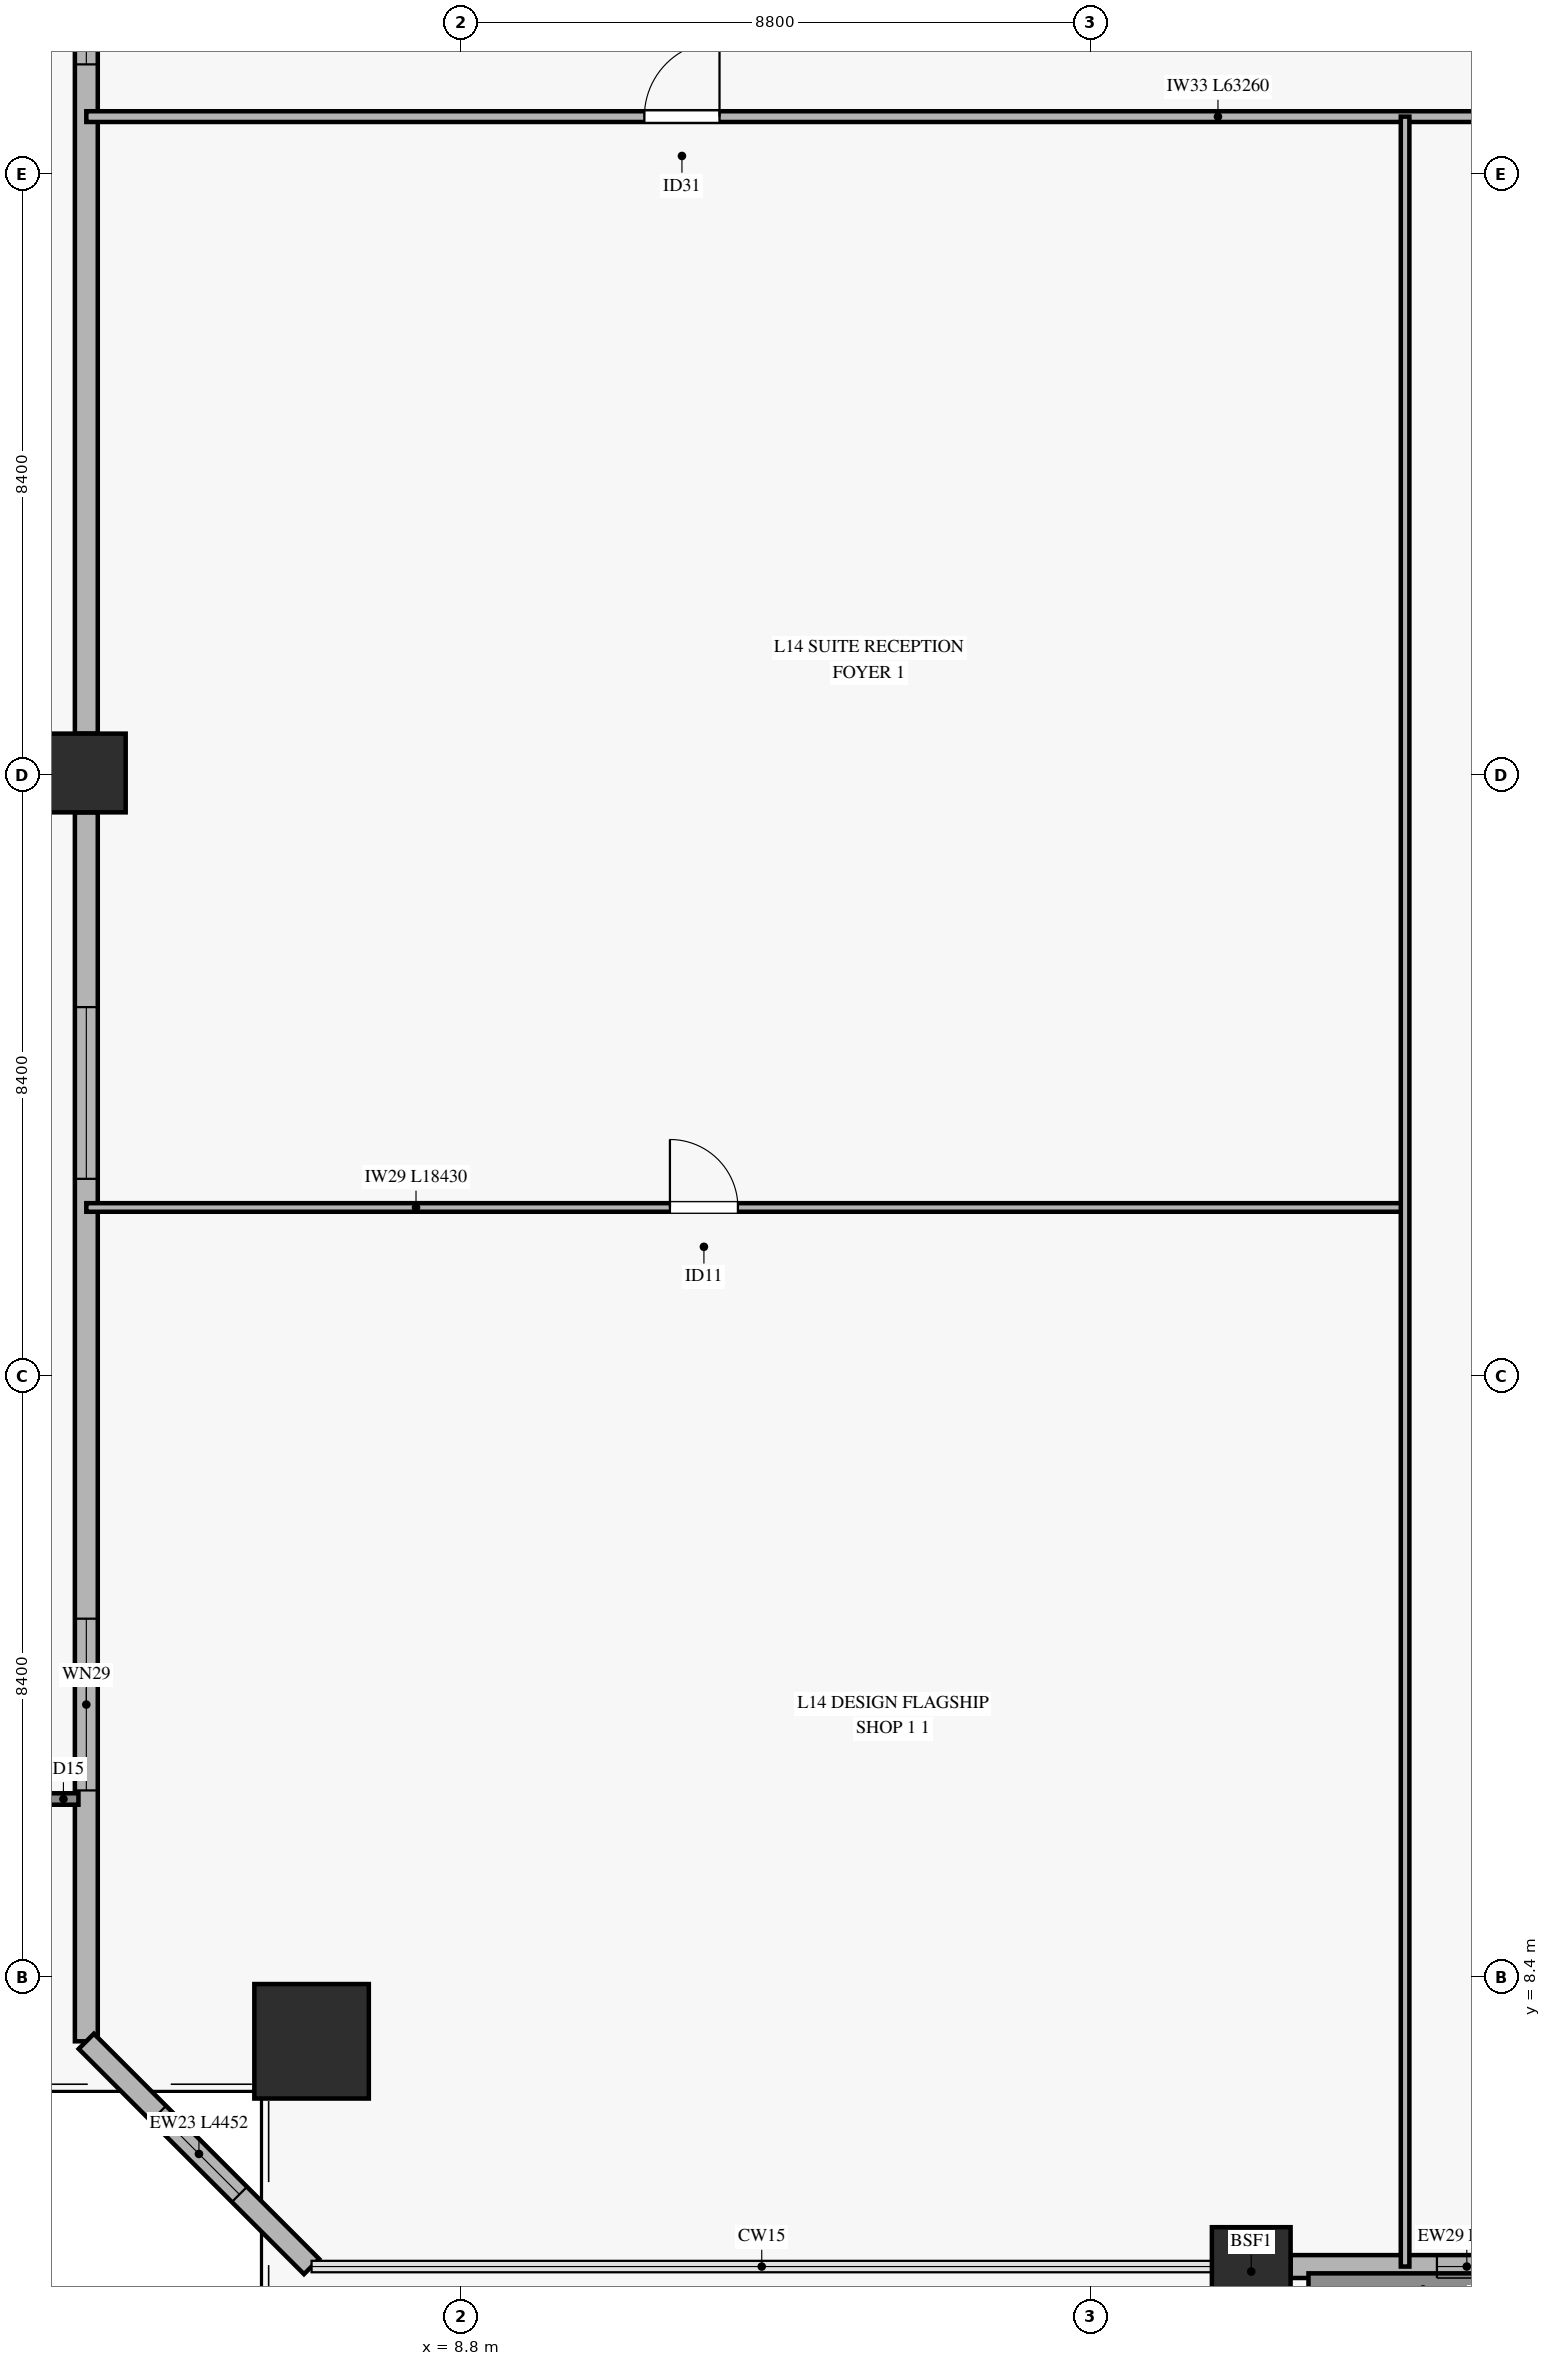
"""IFC4 building model, lengths in metres.
Left out: names, types, materials, properties, quantities, classifications, styles, units other than length and angle.
Written with IfcOpenShell. Run it as: python <this file> out.ifc"""

import sys

from ifc_helpers import new_model, si_unit, direction, frame, frame_2d, origin, origin_2d, place, context, subcontext, project, spatial, rectangle, hollow_rectangle, extrude, source, transform, mapped, element, fill, save


model = new_model("IFC4")
c1 = context("Model", 3, precision=1e-05, world=origin(), true_north=direction((0.0, 1.0)))
c2 = subcontext(c1, "Body", "Model", "MODEL_VIEW")
j1 = project(units=[si_unit("LENGTHUNIT", "METRE"), si_unit("PLANEANGLEUNIT", "RADIAN")], contexts=[c1])
p1 = place(None, origin())
s1 = spatial("IfcSite", under=j1, at=p1, CompositionType="ELEMENT")
p2 = place(p1, origin())
s2 = spatial("IfcBuilding", under=s1, at=p2, CompositionType="ELEMENT")
p3 = place(p2, frame((0.0, 0.0, 57.2)))
s3 = spatial("IfcBuildingStorey", under=s2, at=p3, CompositionType="ELEMENT", Elevation=57.2)
m1 = source(origin(), c2, "Body", "SweptSolid", [
    extrude(hollow_rectangle(XDim=1.6, YDim=1.6, WallThickness=0.075, at=origin_2d()), origin(), (0.0, 0.0, 1.0), 3.72),
])
p4 = place(p3, frame((6.718, 7.502, 0.0), z_axis=(0.056180364921, 0.134937885839, 0.989260093991), x_axis=(-0.923183164535, 0.384360305857, 0.0)))
e1 = element("IfcColumn", 1, at=p4, inside=s3, PredefinedType="COLUMN", context=c2, shape_type="MappedRepresentation", body=[
    mapped(m1, transform((0.0, 0.0, 0.0), x_axis=(1.0, 0.0, 0.0), y_axis=(0.0, 1.0, 0.0), z_axis=(0.0, 0.0, 1.0), scale=1.0)),
])
m2 = source(origin(), c2, "Body", "SweptSolid", [
    extrude(hollow_rectangle(XDim=1.1, YDim=1.1, WallThickness=0.05, at=origin_2d()), origin(), (0.0, 0.0, 1.0), 3.718),
])
p5 = place(p3, frame((19.85, 4.354, 0.0), z_axis=(0.0, 0.142046516587, 0.989859983596), x_axis=(-1.0, 0.0, 0.0)))
e2 = element("IfcColumn", 2, at=p5, inside=s3, PredefinedType="COLUMN", context=c2, shape_type="MappedRepresentation", body=[
    mapped(m2, transform((0.0, 0.0, 0.0), x_axis=(1.0, 0.0, 0.0), y_axis=(0.0, 1.0, 0.0), z_axis=(0.0, 0.0, 1.0), scale=1.0)),
])
m3 = source(origin(), c2, "Body", "SweptSolid", [
    extrude(hollow_rectangle(XDim=1.1, YDim=1.1, WallThickness=0.05, at=origin_2d()), origin(), (0.0, 0.0, 1.0), 3.697),
])
p6 = place(p3, frame((3.57, 25.227, 0.0), z_axis=(0.063530627599, 0.071389405857, 0.995423232644), x_axis=(-0.747027925172, 0.664792658664, 0.0)))
e3 = element("IfcColumn", 3, at=p6, inside=s3, PredefinedType="COLUMN", context=c2, shape_type="MappedRepresentation", body=[
    mapped(m3, transform((0.0, 0.0, 0.0), x_axis=(1.0, 0.0, 0.0), y_axis=(0.0, 1.0, 0.0), z_axis=(0.0, 0.0, 1.0), scale=1.0)),
])
p7 = place(p3, frame((20.4, 4.354, 0.0), z_axis=(0.0, 0.0, 1.0), x_axis=(1.0, 0.0, 0.0)))
e4 = element("IfcWall", 4, at=p7, inside=s3, PredefinedType="SOLIDWALL", context=c2, shape_type="SweptSolid", body=[
    extrude(rectangle(XDim=9.85, YDim=0.32, at=frame_2d((4.925, 0.0))), origin(), (0.0, 0.0, 1.0), 3.16),
])
p8 = place(p7, frame((4.0, 0.0, 0.0)))
e5 = element("IfcOpeningElement", 5, at=p8, cuts=e4, PredefinedType="OPENING", context=c2, shape_type="SweptSolid", body=[
    extrude(rectangle(XDim=1.8, YDim=2.25, at=frame_2d((0.9, 1.125))), frame((0.0, 0.17, 0.0), z_axis=(0.0, -1.0, 0.0), x_axis=(1.0, 0.0, 0.0)), (0.0, 0.0, 1.0), 0.34),
])
p9 = place(p7, frame((2.045, 0.0, 0.45)))
e6 = element("IfcOpeningElement", 6, at=p9, cuts=e4, PredefinedType="OPENING", context=c2, shape_type="SweptSolid", body=[
    extrude(rectangle(XDim=1.6, YDim=2.0, at=frame_2d((0.8, 1.0))), frame((0.0, 0.17, 0.0), z_axis=(0.0, -1.0, 0.0), x_axis=(1.0, 0.0, 0.0)), (0.0, 0.0, 1.0), 0.34),
])
p10 = place(p7, frame((7.35, 0.0, 0.45)))
e7 = element("IfcOpeningElement", 7, at=p10, cuts=e4, PredefinedType="OPENING", context=c2, shape_type="SweptSolid", body=[
    extrude(rectangle(XDim=1.6, YDim=2.0, at=frame_2d((0.8, 1.0))), frame((0.0, 0.17, 0.0), z_axis=(0.0, -1.0, 0.0), x_axis=(1.0, 0.0, 0.0)), (0.0, 0.0, 1.0), 0.34),
])
p11 = place(p3, frame((3.57, 7.502, 0.0), z_axis=(0.0, 0.0, 1.0), x_axis=(0.0, 1.0, 0.0)))
e8 = element("IfcWall", 8, at=p11, inside=s3, PredefinedType="SOLIDWALL", context=c2, shape_type="SweptSolid", body=[
    extrude(rectangle(XDim=17.175, YDim=0.32, at=frame_2d((8.587, 0.0))), origin(), (0.0, 0.0, 1.0), 3.16),
])
p12 = place(p11, frame((3.506, 0.0, 0.45)))
e9 = element("IfcOpeningElement", 9, at=p12, cuts=e8, PredefinedType="OPENING", context=c2, shape_type="SweptSolid", body=[
    extrude(rectangle(XDim=2.4, YDim=2.1, at=frame_2d((1.2, 1.05))), frame((0.0, 0.17, 0.0), z_axis=(0.0, -1.0, 0.0), x_axis=(1.0, 0.0, 0.0)), (0.0, 0.0, 1.0), 0.34),
])
p13 = place(p11, frame((12.053, 0.0, 0.45)))
e10 = element("IfcOpeningElement", 10, at=p13, cuts=e8, PredefinedType="OPENING", context=c2, shape_type="SweptSolid", body=[
    extrude(rectangle(XDim=2.4, YDim=2.1, at=frame_2d((1.2, 1.05))), frame((0.0, 0.17, 0.0), z_axis=(0.0, -1.0, 0.0), x_axis=(1.0, 0.0, 0.0)), (0.0, 0.0, 1.0), 0.34),
])
p14 = place(p3, frame((3.57, 25.777, 0.0), z_axis=(0.0, 0.0, 1.0), x_axis=(0.0, 1.0, 0.0)))
e11 = element("IfcWall", 11, at=p14, inside=s3, PredefinedType="SOLIDWALL", context=c2, shape_type="SweptSolid", body=[
    extrude(rectangle(XDim=17.175, YDim=0.32, at=frame_2d((8.587, 0.0))), origin(), (0.0, 0.0, 1.0), 3.16),
])
p15 = place(p14, frame((9.353, 0.0, 0.45)))
e12 = element("IfcOpeningElement", 12, at=p15, cuts=e11, PredefinedType="OPENING", context=c2, shape_type="SweptSolid", body=[
    extrude(rectangle(XDim=1.6, YDim=2.0, at=frame_2d((0.8, 1.0))), frame((0.0, 0.17, 0.0), z_axis=(0.0, -1.0, 0.0), x_axis=(1.0, 0.0, 0.0)), (0.0, 0.0, 1.0), 0.34),
])
p16 = place(p3, frame((3.57, 7.502, 0.0), z_axis=(0.0, 0.0, 1.0), x_axis=(0.707106781187, -0.707106781187, 0.0)))
e13 = element("IfcWall", 13, at=p16, inside=s3, PredefinedType="SOLIDWALL", context=c2, shape_type="SweptSolid", body=[
    extrude(rectangle(XDim=4.452, YDim=0.3, at=frame_2d((2.226, 0.0))), origin(), (0.0, 0.0, 1.0), 3.16),
])
p17 = place(p16, frame((1.426, 0.0, 0.45)))
e14 = element("IfcOpeningElement", 14, at=p17, cuts=e13, PredefinedType="OPENING", context=c2, shape_type="SweptSolid", body=[
    extrude(rectangle(XDim=1.6, YDim=2.0, at=frame_2d((0.8, 1.0))), frame((0.0, 0.16, 0.0), z_axis=(0.0, -1.0, 0.0), x_axis=(1.0, 0.0, 0.0)), (0.0, 0.0, 1.0), 0.32),
])
p18 = place(p3, frame((3.57, 34.4, 0.0), z_axis=(0.0, 0.0, 1.0), x_axis=(1.0, 0.0, 0.0)))
e15 = element("IfcWall", 15, at=p18, inside=s3, PredefinedType="PARTITIONING", context=c2, shape_type="SweptSolid", body=[
    extrude(rectangle(XDim=63.26, YDim=0.15, at=frame_2d((31.63, 0.0))), origin(), (0.0, 0.0, 1.0), 2.765),
])
p19 = place(p18, frame((7.799, 0.0, 0.0)))
e16 = element("IfcOpeningElement", 16, at=p19, cuts=e15, PredefinedType="OPENING", context=c2, shape_type="SweptSolid", body=[
    extrude(rectangle(XDim=1.05, YDim=2.15, at=frame_2d((0.525, 1.075))), frame((0.0, 0.085, 0.0), z_axis=(0.0, -1.0, 0.0), x_axis=(1.0, 0.0, 0.0)), (0.0, 0.0, 1.0), 0.17),
])
p20 = place(p18, frame((22.121, 0.0, 0.0)))
e17 = element("IfcOpeningElement", 17, at=p20, cuts=e15, PredefinedType="OPENING", context=c2, shape_type="SweptSolid", body=[
    extrude(rectangle(XDim=1.05, YDim=2.15, at=frame_2d((0.525, 1.075))), frame((0.0, 0.085, 0.0), z_axis=(0.0, -1.0, 0.0), x_axis=(1.0, 0.0, 0.0)), (0.0, 0.0, 1.0), 0.17),
])
p21 = place(p18, frame((30.437, 0.0, 0.0)))
e18 = element("IfcOpeningElement", 18, at=p21, cuts=e15, PredefinedType="OPENING", context=c2, shape_type="SweptSolid", body=[
    extrude(rectangle(XDim=1.05, YDim=2.15, at=frame_2d((0.525, 1.075))), frame((0.0, 0.085, 0.0), z_axis=(0.0, -1.0, 0.0), x_axis=(1.0, 0.0, 0.0)), (0.0, 0.0, 1.0), 0.17),
])
p22 = place(p18, frame((37.965, 0.0, 0.0)))
e19 = element("IfcOpeningElement", 19, at=p22, cuts=e15, PredefinedType="OPENING", context=c2, shape_type="SweptSolid", body=[
    extrude(rectangle(XDim=1.05, YDim=2.15, at=frame_2d((0.525, 1.075))), frame((0.0, 0.085, 0.0), z_axis=(0.0, -1.0, 0.0), x_axis=(1.0, 0.0, 0.0)), (0.0, 0.0, 1.0), 0.17),
])
p23 = place(p18, frame((50.274, 0.0, 0.0)))
e20 = element("IfcOpeningElement", 20, at=p23, cuts=e15, PredefinedType="OPENING", context=c2, shape_type="SweptSolid", body=[
    extrude(rectangle(XDim=1.05, YDim=2.15, at=frame_2d((0.525, 1.075))), frame((0.0, 0.085, 0.0), z_axis=(0.0, -1.0, 0.0), x_axis=(1.0, 0.0, 0.0)), (0.0, 0.0, 1.0), 0.17),
])
p24 = place(p3, frame((3.57, 19.155, 0.0), z_axis=(0.0, 0.0, 1.0), x_axis=(1.0, 0.0, 0.0)))
e21 = element("IfcWall", 21, at=p24, inside=s3, PredefinedType="PARTITIONING", context=c2, shape_type="SweptSolid", body=[
    extrude(rectangle(XDim=18.43, YDim=0.12, at=frame_2d((9.215, 0.0))), origin(), (0.0, 0.0, 1.0), 2.765),
])
p25 = place(p24, frame((8.156, 0.0, 0.0)))
e22 = element("IfcOpeningElement", 22, at=p25, cuts=e21, PredefinedType="OPENING", context=c2, shape_type="SweptSolid", body=[
    extrude(rectangle(XDim=0.95, YDim=2.1, at=frame_2d((0.475, 1.05))), frame((0.0, 0.07, 0.0), z_axis=(0.0, -1.0, 0.0), x_axis=(1.0, 0.0, 0.0)), (0.0, 0.0, 1.0), 0.14),
])
p26 = place(p3, frame((22.0, 4.354, 0.0), z_axis=(0.0, 0.0, 1.0), x_axis=(0.0, 1.0, 0.0)))
e23 = element("IfcWall", 23, at=p26, inside=s3, PredefinedType="PARTITIONING", context=c2, shape_type="SweptSolid", body=[
    extrude(rectangle(XDim=30.046, YDim=0.12, at=frame_2d((15.023, 0.0))), origin(), (0.0, 0.0, 1.0), 3.165),
])
m4 = source(origin(), c2, "Body", "SweptSolid", [
    extrude(rectangle(XDim=1.6, YDim=2.0, at=frame_2d((0.8, 1.0))), frame((0.0, 0.03, 0.0), z_axis=(0.0, -1.0, 0.0), x_axis=(1.0, 0.0, 0.0)), (0.0, 0.0, 1.0), 0.06),
])
p27 = place(p9, origin())
e24 = element("IfcWindow", 24, at=p27, inside=s3, PartitioningType="SINGLE_PANEL", PredefinedType="WINDOW", context=c2, shape_type="MappedRepresentation", body=[
    mapped(m4, transform((0.0, 0.0, 0.0), x_axis=(1.0, 0.0, 0.0), y_axis=(0.0, 1.0, 0.0), z_axis=(0.0, 0.0, 1.0), scale=1.0)),
])
fill(e6, e24)
m5 = source(origin(), c2, "Body", "SweptSolid", [
    extrude(rectangle(XDim=2.4, YDim=2.1, at=frame_2d((1.2, 1.05))), frame((0.0, 0.03, 0.0), z_axis=(0.0, -1.0, 0.0), x_axis=(1.0, 0.0, 0.0)), (0.0, 0.0, 1.0), 0.06),
])
p28 = place(p12, origin())
e25 = element("IfcWindow", 25, at=p28, inside=s3, PartitioningType="SINGLE_PANEL", PredefinedType="WINDOW", context=c2, shape_type="MappedRepresentation", body=[
    mapped(m5, transform((0.0, 0.0, 0.0), x_axis=(1.0, 0.0, 0.0), y_axis=(0.0, 1.0, 0.0), z_axis=(0.0, 0.0, 1.0), scale=1.0)),
])
fill(e9, e25)
p29 = place(p13, origin())
e26 = element("IfcWindow", 26, at=p29, inside=s3, PartitioningType="SINGLE_PANEL", PredefinedType="WINDOW", context=c2, shape_type="MappedRepresentation", body=[
    mapped(m5, transform((0.0, 0.0, 0.0), x_axis=(1.0, 0.0, 0.0), y_axis=(0.0, 1.0, 0.0), z_axis=(0.0, 0.0, 1.0), scale=1.0)),
])
fill(e10, e26)
p30 = place(p15, origin())
e27 = element("IfcWindow", 27, at=p30, inside=s3, PartitioningType="SINGLE_PANEL", PredefinedType="WINDOW", context=c2, shape_type="MappedRepresentation", body=[
    mapped(m4, transform((0.0, 0.0, 0.0), x_axis=(1.0, 0.0, 0.0), y_axis=(0.0, 1.0, 0.0), z_axis=(0.0, 0.0, 1.0), scale=1.0)),
])
fill(e12, e27)
p31 = place(p17, origin())
e28 = element("IfcWindow", 28, at=p31, inside=s3, PartitioningType="SINGLE_PANEL", PredefinedType="WINDOW", context=c2, shape_type="MappedRepresentation", body=[
    mapped(m4, transform((0.0, 0.0, 0.0), x_axis=(1.0, 0.0, 0.0), y_axis=(0.0, 1.0, 0.0), z_axis=(0.0, 0.0, 1.0), scale=1.0)),
])
fill(e14, e28)
m6 = source(origin(), c2, "Body", "SweptSolid", [
    extrude(rectangle(XDim=1.05, YDim=2.15, at=frame_2d((0.525, 1.075))), frame((0.0, 0.025, 0.0), z_axis=(0.0, -1.0, 0.0), x_axis=(1.0, 0.0, 0.0)), (0.0, 0.0, 1.0), 0.05),
])
p32 = place(p19, origin())
e29 = element("IfcDoor", 29, at=p32, inside=s3, OperationType="SINGLE_SWING_RIGHT", PredefinedType="DOOR", context=c2, shape_type="MappedRepresentation", body=[
    mapped(m6, transform((0.0, 0.0, 0.0), x_axis=(1.0, 0.0, 0.0), y_axis=(0.0, 1.0, 0.0), z_axis=(0.0, 0.0, 1.0), scale=1.0)),
])
fill(e16, e29)
m7 = source(origin(), c2, "Body", "SweptSolid", [
    extrude(rectangle(XDim=0.95, YDim=2.1, at=frame_2d((0.475, 1.05))), frame((0.0, 0.025, 0.0), z_axis=(0.0, -1.0, 0.0), x_axis=(1.0, 0.0, 0.0)), (0.0, 0.0, 1.0), 0.05),
])
p33 = place(p25, origin())
e30 = element("IfcDoor", 30, at=p33, inside=s3, OperationType="SINGLE_SWING_LEFT", PredefinedType="DOOR", context=c2, shape_type="MappedRepresentation", body=[
    mapped(m7, transform((0.0, 0.0, 0.0), x_axis=(1.0, 0.0, 0.0), y_axis=(0.0, 1.0, 0.0), z_axis=(0.0, 0.0, 1.0), scale=1.0)),
])
fill(e22, e30)
save(model, sys.argv[1])
